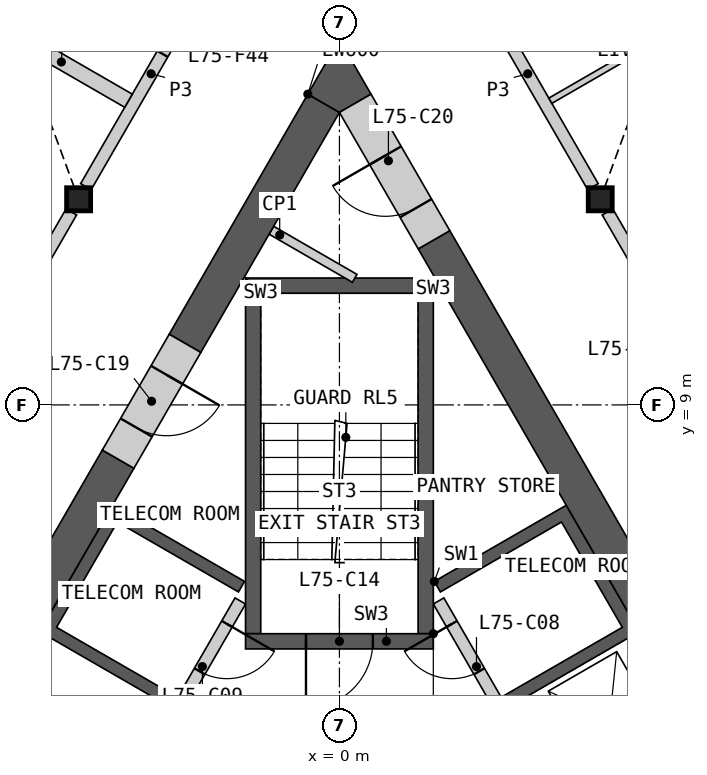
"""IFC4 building model, lengths in metres.
Left out: names, types, materials, properties, quantities, classifications, styles, units other than length and angle.
Written with IfcOpenShell. Run it as: python <this file> out.ifc"""

import sys

from ifc_helpers import new_model, si_unit, direction, frame, frame_2d, origin, origin_2d, place, context, subcontext, project, spatial, polyline, rectangle, i_section, outline, extrude, element, fill, save


model = new_model("IFC4")
c1 = context("Model", 3, precision=1e-05, world=origin(), true_north=direction((0.0, 1.0)))
c2 = subcontext(c1, "Body", "Model", "MODEL_VIEW")
j1 = project(units=[si_unit("LENGTHUNIT", "METRE"), si_unit("PLANEANGLEUNIT", "RADIAN")], contexts=[c1])
p1 = place(None, origin())
s1 = spatial("IfcSite", under=j1, at=p1, CompositionType="ELEMENT")
p2 = place(p1, origin())
s2 = spatial("IfcBuilding", under=s1, at=p2, CompositionType="ELEMENT")
p3 = place(p2, frame((0.0, 0.0, 335.8)))
s3 = spatial("IfcBuildingStorey", under=s2, at=p3, CompositionType="ELEMENT", Elevation=335.8)
for number, where, z_axis, x_axis in (
    (1, (-4.289, 12.382, 0.0), (0.0, 0.0, 1.0), (1.0, 0.0, 0.0)),
    (2, (4.289, 12.382, 0.0), (0.0, 0.0, 1.0), (1.0, 0.0, 0.0)),
):
    element("IfcColumn", number, at=place(p3, frame(where, z_axis=z_axis, x_axis=x_axis)), inside=s3, PredefinedType="COLUMN", context=c2, shape_type="SweptSolid", body=[
        extrude(i_section(OverallWidth=0.396, OverallDepth=0.381, WebThickness=0.019, FlangeThickness=0.03, at=origin_2d()), origin(), (0.0, 0.0, 1.0), 3.4),
    ])
p4 = place(p3, origin())
e3 = element("IfcWall", 3, at=p4, inside=s3, PredefinedType="SHEAR", context=c2, shape_type="SweptSolid", body=[
    extrude(outline(polyline([(1.561, 6.097), (3.731, 7.35), (8.231, -0.444), (6.061, -1.697), (5.96, -1.524), (7.952, -0.374), (6.952, 1.358), (4.96, 0.208), (4.861, 0.381), (6.852, 1.531), (5.852, 3.263), (3.861, 2.113), (3.76, 2.287), (5.752, 3.437), (4.752, 5.169), (2.76, 4.019), (2.66, 4.192), (4.652, 5.342), (3.652, 7.074), (1.66, 5.924), (1.561, 6.097)])), origin(), (0.0, 0.0, 1.0), 3.1),
])
p5 = place(p3, frame((5.817, -1.476, 0.0), z_axis=(0.0, 0.0, 1.0), x_axis=(-0.500002616675, 0.866023893041, 0.0)))
e4 = element("IfcWall", 4, at=p5, inside=s3, PredefinedType="SOLIDWALL", context=c2, shape_type="SweptSolid", body=[
    extrude(rectangle(XDim=8.373, YDim=0.2, at=frame_2d((4.187, 0.0))), origin(), (0.0, 0.0, 1.0), 3.1),
])
p6 = place(p5, frame((0.337, 0.0, 0.0)))
e5 = element("IfcOpeningElement", 5, at=p6, cuts=e4, PredefinedType="OPENING", context=c2, shape_type="SweptSolid", body=[
    extrude(rectangle(XDim=1.1, YDim=2.1, at=frame_2d((0.55, 1.05))), frame((0.0, 0.11, 0.0), z_axis=(0.0, -1.0, 0.0), x_axis=(1.0, 0.0, 0.0)), (0.0, 0.0, 1.0), 0.22),
])
p7 = place(p5, frame((2.537, 0.0, 0.0)))
e6 = element("IfcOpeningElement", 6, at=p7, cuts=e4, PredefinedType="OPENING", context=c2, shape_type="SweptSolid", body=[
    extrude(rectangle(XDim=1.1, YDim=2.1, at=frame_2d((0.55, 1.05))), frame((0.0, 0.11, 0.0), z_axis=(0.0, -1.0, 0.0), x_axis=(1.0, 0.0, 0.0)), (0.0, 0.0, 1.0), 0.22),
])
p8 = place(p5, frame((4.737, 0.0, 0.0)))
e7 = element("IfcOpeningElement", 7, at=p8, cuts=e4, PredefinedType="OPENING", context=c2, shape_type="SweptSolid", body=[
    extrude(rectangle(XDim=1.1, YDim=2.1, at=frame_2d((0.55, 1.05))), frame((0.0, 0.11, 0.0), z_axis=(0.0, -1.0, 0.0), x_axis=(1.0, 0.0, 0.0)), (0.0, 0.0, 1.0), 0.22),
])
p9 = place(p5, frame((7.037, 0.0, 0.0)))
e8 = element("IfcOpeningElement", 8, at=p9, cuts=e4, PredefinedType="OPENING", context=c2, shape_type="SweptSolid", body=[
    extrude(rectangle(XDim=0.9, YDim=2.1, at=frame_2d((0.45, 1.05))), frame((0.0, 0.11, 0.0), z_axis=(0.0, -1.0, 0.0), x_axis=(1.0, 0.0, 0.0)), (0.0, 0.0, 1.0), 0.22),
])
p10 = place(p3, origin())
e9 = element("IfcWall", 9, at=p10, inside=s3, PredefinedType="SHEAR", context=c2, shape_type="SweptSolid", body=[
    extrude(outline(polyline([(-4.96, 0.208), (-7.131, 1.461), (-3.731, 7.35), (-1.561, 6.097), (-1.66, 5.924), (-3.652, 7.074), (-4.652, 5.342), (-2.66, 4.192), (-2.76, 4.019), (-4.752, 5.169), (-6.852, 1.531), (-4.861, 0.381), (-4.96, 0.208)])), origin(), (0.0, 0.0, 1.0), 3.1),
])
p11 = place(p3, frame((-1.631, 5.776, 0.0), z_axis=(0.0, 0.0, 1.0), x_axis=(-0.499992876559, -0.866029516466, 0.0)))
e10 = element("IfcWall", 10, at=p11, inside=s3, PredefinedType="SOLIDWALL", context=c2, shape_type="SweptSolid", body=[
    extrude(rectangle(XDim=6.486, YDim=0.2, at=frame_2d((3.243, 0.0))), origin(), (0.0, 0.0, 1.0), 3.1),
])
p12 = place(p11, frame((0.437, 0.0, 0.0)))
e11 = element("IfcOpeningElement", 11, at=p12, cuts=e10, PredefinedType="OPENING", context=c2, shape_type="SweptSolid", body=[
    extrude(rectangle(XDim=0.9, YDim=2.1, at=frame_2d((0.45, 1.05))), frame((0.0, 0.11, 0.0), z_axis=(0.0, -1.0, 0.0), x_axis=(1.0, 0.0, 0.0)), (0.0, 0.0, 1.0), 0.22),
])
p13 = place(p11, frame((3.737, 0.0, 0.0)))
e12 = element("IfcOpeningElement", 12, at=p13, cuts=e10, PredefinedType="OPENING", context=c2, shape_type="SweptSolid", body=[
    extrude(rectangle(XDim=0.9, YDim=2.1, at=frame_2d((0.45, 1.05))), frame((0.0, 0.11, 0.0), z_axis=(0.0, -1.0, 0.0), x_axis=(1.0, 0.0, 0.0)), (0.0, 0.0, 1.0), 0.22),
])
p14 = place(p3, origin())
e13 = element("IfcWall", 13, at=p14, inside=s3, PredefinedType="SHEAR", context=c2, shape_type="SweptSolid", body=[
    extrude(outline(polyline([(1.544, 5.237), (1.544, 11.087), (1.294, 10.837), (1.294, 5.237), (1.544, 5.237)])), origin(), (0.0, 0.0, 1.0), 3.1),
])
p15 = place(p3, origin())
e14 = element("IfcWall", 14, at=p15, inside=s3, PredefinedType="SHEAR", context=c2, shape_type="SweptSolid", body=[
    extrude(outline(polyline([(1.544, 11.087), (-1.544, 11.087), (-1.294, 10.837), (1.294, 10.837), (1.544, 11.087)])), origin(), (0.0, 0.0, 1.0), 3.1),
])
p16 = place(p3, origin())
e15 = element("IfcWall", 15, at=p16, inside=s3, PredefinedType="SHEAR", context=c2, shape_type="SweptSolid", body=[
    extrude(outline(polyline([(-1.294, 10.837), (-1.544, 11.087), (-1.544, 5.237), (-1.294, 5.237), (-1.294, 10.837)])), origin(), (0.0, 0.0, 1.0), 3.1),
])
p17 = place(p3, frame((1.544, 5.112, 0.0), z_axis=(0.0, 0.0, 1.0), x_axis=(-1.0, 0.0, 0.0)))
e16 = element("IfcWall", 16, at=p17, inside=s3, PredefinedType="SHEAR", context=c2, shape_type="SweptSolid", body=[
    extrude(rectangle(XDim=3.088, YDim=0.25, at=frame_2d((1.544, 0.0))), origin(), (0.0, 0.0, 1.0), 3.1),
])
p18 = place(p17, frame((0.994, 0.0, 0.0)))
e17 = element("IfcOpeningElement", 17, at=p18, cuts=e16, PredefinedType="OPENING", context=c2, shape_type="SweptSolid", body=[
    extrude(rectangle(XDim=1.1, YDim=2.1, at=frame_2d((0.55, 1.05))), frame((0.0, 0.135, 0.0), z_axis=(0.0, -1.0, 0.0), x_axis=(1.0, 0.0, 0.0)), (0.0, 0.0, 1.0), 0.27),
])
p19 = place(p3, frame((-1.119, 11.873, 0.0), z_axis=(0.0, 0.0, 1.0), x_axis=(0.865992812752, -0.500056445075, 0.0)))
e18 = element("IfcWall", 18, at=p19, inside=s3, PredefinedType="PARTITIONING", context=c2, shape_type="SweptSolid", body=[
    extrude(rectangle(XDim=1.582, YDim=0.15, at=frame_2d((0.791, 0.0))), origin(), (0.0, 0.0, 1.0), 3.1),
])
p20 = place(p3, frame((8.841, -0.902, 0.0), z_axis=(0.0, 0.0, 1.0), x_axis=(-0.499995618375, 0.866027933502, 0.0)))
e19 = element("IfcWall", 19, at=p20, inside=s3, PredefinedType="SHEAR", context=c2, shape_type="SweptSolid", body=[
    extrude(rectangle(XDim=14.571, YDim=0.6, at=frame_2d((7.285, 0.0))), origin(), (0.0, 0.0, 1.0), 3.1),
])
p21 = place(p3, frame((-3.639, 8.107, 0.0), z_axis=(0.0, 0.0, 1.0), x_axis=(-0.49999180351, -0.866030135978, 0.0)))
e20 = element("IfcWall", 20, at=p21, inside=s3, PredefinedType="SHEAR", context=c2, shape_type="SweptSolid", body=[
    extrude(rectangle(XDim=7.401, YDim=0.6, at=frame_2d((3.701, 0.0))), origin(), (0.0, 0.0, 1.0), 3.1),
])
p22 = place(p3, frame((-0.26, 13.961, 0.0), z_axis=(0.0, 0.0, 1.0), x_axis=(-0.499980485389, -0.866036670257, 0.0)))
e21 = element("IfcWall", 21, at=p22, inside=s3, PredefinedType="SHEAR", context=c2, shape_type="SweptSolid", body=[
    extrude(rectangle(XDim=4.559, YDim=0.6, at=frame_2d((2.28, 0.0))), origin(), (0.0, 0.0, 1.0), 3.1),
])
p23 = place(p3, origin())
e22 = element("IfcWall", 22, at=p23, inside=s3, PredefinedType="SHEAR", context=c2, shape_type="SweptSolid", body=[
    extrude(outline(polyline([(-0.52, 14.111), (0.0, 15.011), (0.52, 14.111), (0.0, 13.811), (-0.52, 14.111)])), origin(), (0.0, 0.0, 1.0), 3.1),
])
p24 = place(p3, frame((-2.539, 10.013, 0.0), z_axis=(0.0, 0.0, 1.0), x_axis=(-0.50002983664, -0.866008176907, 0.0)))
e23 = element("IfcWall", 23, at=p24, inside=s3, PredefinedType="SHEAR", context=c2, shape_type="SweptSolid", body=[
    extrude(rectangle(XDim=2.2, YDim=0.6, at=frame_2d((1.1, 0.0))), origin(), (0.0, 0.0, 1.0), 3.1),
])
p25 = place(p24, frame((0.6, 0.0, 0.0)))
e24 = element("IfcOpeningElement", 24, at=p25, cuts=e23, PredefinedType="OPENING", context=c2, shape_type="SweptSolid", body=[
    extrude(rectangle(XDim=1.0, YDim=2.1, at=frame_2d((0.5, 1.05))), frame((0.0, 0.31, 0.0), z_axis=(0.0, -1.0, 0.0), x_axis=(1.0, 0.0, 0.0)), (0.0, 0.0, 1.0), 0.62),
])
p26 = place(p3, frame((1.556, 11.716, 0.0), z_axis=(0.0, 0.0, 1.0), x_axis=(-0.500018667571, 0.866014625789, 0.0)))
e25 = element("IfcWall", 25, at=p26, inside=s3, PredefinedType="SHEAR", context=c2, shape_type="SweptSolid", body=[
    extrude(rectangle(XDim=2.592, YDim=0.6, at=frame_2d((1.296, 0.0))), origin(), (0.0, 0.0, 1.0), 3.1),
])
p27 = place(p26, frame((0.6, 0.0, 0.0)))
e26 = element("IfcOpeningElement", 26, at=p27, cuts=e25, PredefinedType="OPENING", context=c2, shape_type="SweptSolid", body=[
    extrude(rectangle(XDim=1.0, YDim=2.1, at=frame_2d((0.5, 1.05))), frame((0.0, 0.31, 0.0), z_axis=(0.0, -1.0, 0.0), x_axis=(1.0, 0.0, 0.0)), (0.0, 0.0, 1.0), 0.62),
])
p28 = place(p3, frame((4.409, 12.174, 0.0), z_axis=(0.0, 0.0, 1.0), x_axis=(0.499984266882, -0.866034487114, 0.0)))
e27 = element("IfcWall", 27, at=p28, inside=s3, PredefinedType="PARTITIONING", context=c2, shape_type="SweptSolid", body=[
    extrude(rectangle(XDim=8.099, YDim=0.2, at=frame_2d((4.049, 0.0))), origin(), (0.0, 0.0, 1.0), 3.1),
])
p29 = place(p28, frame((1.164, 0.0, 0.0)))
e28 = element("IfcOpeningElement", 28, at=p29, cuts=e27, PredefinedType="OPENING", context=c2, shape_type="SweptSolid", body=[
    extrude(rectangle(XDim=1.0, YDim=2.1, at=frame_2d((0.5, 1.05))), frame((0.0, 0.11, 0.0), z_axis=(0.0, -1.0, 0.0), x_axis=(1.0, 0.0, 0.0)), (0.0, 0.0, 1.0), 0.22),
])
p30 = place(p3, frame((-8.458, 5.16, 0.0), z_axis=(0.0, 0.0, 1.0), x_axis=(0.499984266882, 0.866034487114, 0.0)))
e29 = element("IfcWall", 29, at=p30, inside=s3, PredefinedType="PARTITIONING", context=c2, shape_type="SweptSolid", body=[
    extrude(rectangle(XDim=8.099, YDim=0.2, at=frame_2d((4.049, 0.0))), origin(), (0.0, 0.0, 1.0), 3.1),
])
p31 = place(p30, frame((1.976, 0.0, 0.0)))
e30 = element("IfcOpeningElement", 30, at=p31, cuts=e29, PredefinedType="OPENING", context=c2, shape_type="SweptSolid", body=[
    extrude(rectangle(XDim=1.0, YDim=2.1, at=frame_2d((0.5, 1.05))), frame((0.0, 0.11, 0.0), z_axis=(0.0, -1.0, 0.0), x_axis=(1.0, 0.0, 0.0)), (0.0, 0.0, 1.0), 0.22),
])
p32 = place(p3, frame((2.025, 16.303, 0.0), z_axis=(0.0, 0.0, 1.0), x_axis=(0.499978750566, -0.866037671803, 0.0)))
e31 = element("IfcWall", 31, at=p32, inside=s3, PredefinedType="PARTITIONING", context=c2, shape_type="SweptSolid", body=[
    extrude(rectangle(XDim=4.288, YDim=0.2, at=frame_2d((2.144, 0.0))), origin(), (0.0, 0.0, 1.0), 3.1),
])
p33 = place(p3, frame((-4.169, 12.59, 0.0), z_axis=(0.0, 0.0, 1.0), x_axis=(0.499978750566, 0.866037671803, 0.0)))
e32 = element("IfcWall", 32, at=p33, inside=s3, PredefinedType="PARTITIONING", context=c2, shape_type="SweptSolid", body=[
    extrude(rectangle(XDim=4.288, YDim=0.2, at=frame_2d((2.144, 0.0))), origin(), (0.0, 0.0, 1.0), 3.1),
])
p34 = place(p33, frame((2.521, 0.0, 0.0)))
e33 = element("IfcOpeningElement", 33, at=p34, cuts=e32, PredefinedType="OPENING", context=c2, shape_type="SweptSolid", body=[
    extrude(rectangle(XDim=1.0, YDim=2.1, at=frame_2d((0.5, 1.05))), frame((0.0, 0.11, 0.0), z_axis=(0.0, -1.0, 0.0), x_axis=(1.0, 0.0, 0.0)), (0.0, 0.0, 1.0), 0.22),
])
p35 = place(p3, frame((-5.677, 15.278, 0.0), z_axis=(0.0, 0.0, 1.0), x_axis=(0.866013403995, -0.500020783669, 0.0)))
e34 = element("IfcWall", 34, at=p35, inside=s3, PredefinedType="PARTITIONING", context=c2, shape_type="SweptSolid", body=[
    extrude(rectangle(XDim=2.55, YDim=0.25, at=frame_2d((1.275, 0.0))), origin(), (0.0, 0.0, 1.0), 2.33),
])
p36 = place(p3, frame((3.469, 14.003, 0.0), z_axis=(0.0, 0.0, 1.0), x_axis=(0.866021563384, 0.50000665171, 0.0)))
e35 = element("IfcWall", 35, at=p36, inside=s3, PredefinedType="PARTITIONING", context=c2, shape_type="SweptSolid", body=[
    extrude(rectangle(XDim=12.641, YDim=0.1, at=frame_2d((6.321, 0.0))), origin(), (0.0, 0.0, 1.0), 2.33),
])
p37 = place(p36, frame((8.215, 0.0, 0.0)))
e36 = element("IfcOpeningElement", 36, at=p37, cuts=e35, PredefinedType="OPENING", context=c2, shape_type="SweptSolid", body=[
    extrude(rectangle(XDim=0.95, YDim=2.1, at=frame_2d((0.475, 1.05))), frame((0.0, 0.06, 0.0), z_axis=(0.0, -1.0, 0.0), x_axis=(1.0, 0.0, 0.0)), (0.0, 0.0, 1.0), 0.12),
])
p38 = place(p3, frame((-7.095, 12.921, 0.0), z_axis=(0.0, 0.0, 1.0), x_axis=(0.499996545922, 0.866027397988, 0.0)))
e37 = element("IfcWall", 37, at=p38, inside=s3, PredefinedType="PARTITIONING", context=c2, shape_type="SweptSolid", body=[
    extrude(rectangle(XDim=5.5, YDim=0.1, at=frame_2d((2.75, 0.0))), origin(), (0.0, 0.0, 1.0), 2.33),
])
p39 = place(p9, origin())
e38 = element("IfcDoor", 38, at=p39, inside=s3, OperationType="SINGLE_SWING_RIGHT", PredefinedType="DOOR", context=c2, shape_type="SweptSolid", body=[
    extrude(rectangle(XDim=0.9, YDim=2.1, at=frame_2d((0.45, 1.05))), frame((0.0, 0.025, 0.0), z_axis=(0.0, -1.0, 0.0), x_axis=(1.0, 0.0, 0.0)), (0.0, 0.0, 1.0), 0.05),
])
fill(e8, e38)
p40 = place(p12, origin())
e39 = element("IfcDoor", 39, at=p40, inside=s3, OperationType="SINGLE_SWING_LEFT", PredefinedType="DOOR", context=c2, shape_type="SweptSolid", body=[
    extrude(rectangle(XDim=0.9, YDim=2.1, at=frame_2d((0.45, 1.05))), frame((0.0, 0.025, 0.0), z_axis=(0.0, -1.0, 0.0), x_axis=(1.0, 0.0, 0.0)), (0.0, 0.0, 1.0), 0.05),
])
fill(e11, e39)
p41 = place(p18, origin())
e40 = element("IfcDoor", 40, at=p41, inside=s3, OperationType="SINGLE_SWING_RIGHT", PredefinedType="DOOR", context=c2, shape_type="SweptSolid", body=[
    extrude(rectangle(XDim=1.1, YDim=2.1, at=frame_2d((0.55, 1.05))), frame((0.0, 0.025, 0.0), z_axis=(0.0, -1.0, 0.0), x_axis=(1.0, 0.0, 0.0)), (0.0, 0.0, 1.0), 0.05),
])
fill(e17, e40)
p42 = place(p25, origin())
e41 = element("IfcDoor", 41, at=p42, inside=s3, OperationType="SINGLE_SWING_LEFT", PredefinedType="DOOR", context=c2, shape_type="SweptSolid", body=[
    extrude(rectangle(XDim=1.0, YDim=2.1, at=frame_2d((0.5, 1.05))), frame((0.0, 0.055, 0.0), z_axis=(0.0, -1.0, 0.0), x_axis=(1.0, 0.0, 0.0)), (0.0, 0.0, 1.0), 0.05),
])
fill(e24, e41)
p43 = place(p27, origin())
e42 = element("IfcDoor", 42, at=p43, inside=s3, OperationType="SINGLE_SWING_RIGHT", PredefinedType="DOOR", context=c2, shape_type="SweptSolid", body=[
    extrude(rectangle(XDim=1.0, YDim=2.1, at=frame_2d((0.5, 1.05))), frame((0.0, 0.055, 0.0), z_axis=(0.0, -1.0, 0.0), x_axis=(1.0, 0.0, 0.0)), (0.0, 0.0, 1.0), 0.05),
])
fill(e26, e42)
p44 = place(p34, origin())
e43 = element("IfcDoor", 43, at=p44, inside=s3, OperationType="SINGLE_SWING_RIGHT", PredefinedType="DOOR", context=c2, shape_type="SweptSolid", body=[
    extrude(rectangle(XDim=1.0, YDim=2.1, at=frame_2d((0.5, 1.05))), frame((0.0, 0.025, 0.0), z_axis=(0.0, -1.0, 0.0), x_axis=(1.0, 0.0, 0.0)), (0.0, 0.0, 1.0), 0.05),
])
fill(e33, e43)
save(model, sys.argv[1])
